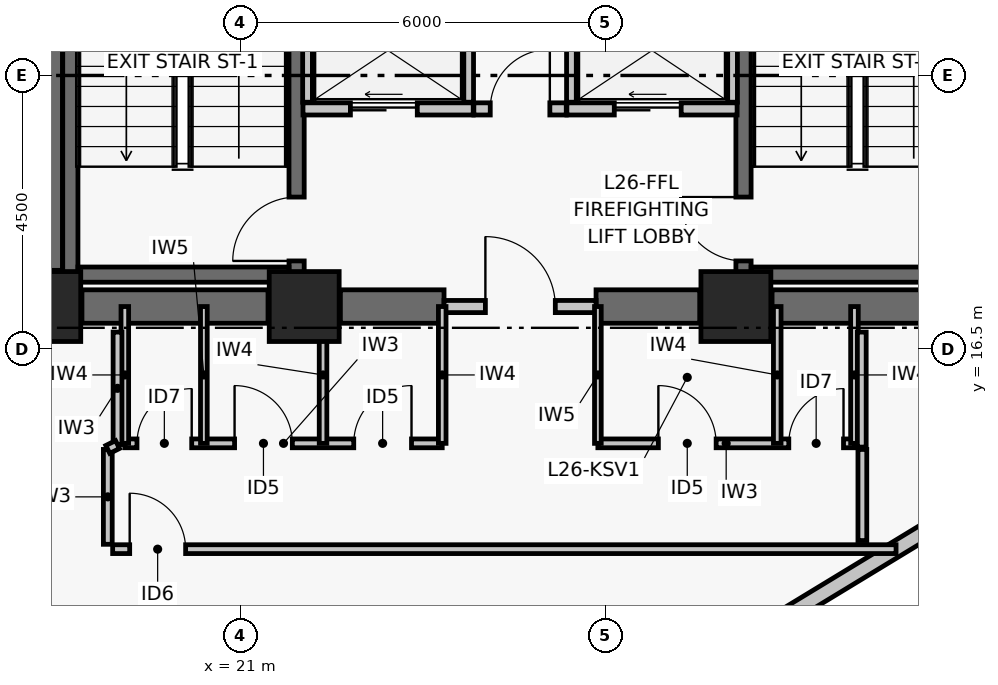
"""IFC4 building model, lengths in metres.
Left out: names, types, materials, properties, quantities, classifications, styles, units other than length and angle.
Written with IfcOpenShell. Run it as: python <this file> out.ifc"""

import sys

from ifc_helpers import new_model, si_unit, direction, frame, frame_2d, origin, origin_2d, place, context, subcontext, project, spatial, rectangle, extrude, element, fill, save


model = new_model("IFC4")
c1 = context("Model", 3, precision=1e-05, world=origin(), true_north=direction((0.0, 1.0)))
c2 = subcontext(c1, "Body", "Model", "MODEL_VIEW")
j1 = project(units=[si_unit("LENGTHUNIT", "METRE"), si_unit("PLANEANGLEUNIT", "RADIAN")], contexts=[c1])
p1 = place(None, origin())
s1 = spatial("IfcSite", under=j1, at=p1, CompositionType="ELEMENT")
p2 = place(p1, origin())
s2 = spatial("IfcBuilding", under=s1, at=p2, CompositionType="ELEMENT")
p3 = place(p2, frame((0.0, 0.0, 107.7)))
s3 = spatial("IfcBuildingStorey", under=s2, at=p3, CompositionType="ELEMENT", Elevation=107.7)
for number, where, z_axis, x_axis in (
    (1, (17.8, 17.2, 0.0), (0.0, 0.0, 1.0), (1.0, 0.0, 0.0)),
    (2, (22.05, 17.2, 0.0), (0.0, 0.0, 1.0), (1.0, 0.0, 0.0)),
    (3, (29.15, 17.2, 0.0), (0.0, 0.0, 1.0), (1.0, 0.0, 0.0)),
):
    element("IfcColumn", number, at=place(p3, frame(where, z_axis=z_axis, x_axis=x_axis)), inside=s3, PredefinedType="COLUMN", context=c2, shape_type="SweptSolid", body=[
        extrude(rectangle(XDim=1.15, YDim=1.15, at=origin_2d()), origin(), (0.0, 0.0, 1.0), 3.72),
    ])
p4 = place(p3, frame((18.395, 17.2, 0.0), z_axis=(0.0, 0.0, 1.0), x_axis=(1.0, 0.0, 0.0)))
e4 = element("IfcWall", 4, at=p4, inside=s3, PredefinedType="SHEAR", context=c2, shape_type="SweptSolid", body=[
    extrude(rectangle(XDim=3.06, YDim=0.55, at=frame_2d((1.53, 0.0))), origin(), (0.0, 0.0, 1.0), 3.47),
])
p5 = place(p3, frame((22.645, 17.2, 0.0), z_axis=(0.0, 0.0, 1.0), x_axis=(1.0, 0.0, 0.0)))
e5 = element("IfcWall", 5, at=p5, inside=s3, PredefinedType="SHEAR", context=c2, shape_type="SweptSolid", body=[
    extrude(rectangle(XDim=1.705, YDim=0.55, at=frame_2d((0.853, 0.0))), origin(), (0.0, 0.0, 1.0), 3.47),
])
p6 = place(p3, frame((26.85, 17.2, 0.0), z_axis=(0.0, 0.0, 1.0), x_axis=(1.0, 0.0, 0.0)))
e6 = element("IfcWall", 6, at=p6, inside=s3, PredefinedType="SHEAR", context=c2, shape_type="SweptSolid", body=[
    extrude(rectangle(XDim=1.705, YDim=0.55, at=frame_2d((0.853, 0.0))), origin(), (0.0, 0.0, 1.0), 3.47),
])
p7 = place(p3, frame((29.745, 17.2, 0.0), z_axis=(0.0, 0.0, 1.0), x_axis=(1.0, 0.0, 0.0)))
e7 = element("IfcWall", 7, at=p7, inside=s3, PredefinedType="SHEAR", context=c2, shape_type="SweptSolid", body=[
    extrude(rectangle(XDim=3.06, YDim=0.55, at=frame_2d((1.53, 0.0))), origin(), (0.0, 0.0, 1.0), 3.47),
])
p8 = place(p3, frame((17.8, 17.795, 0.0), z_axis=(0.0, 0.0, 1.0), x_axis=(0.0, 1.0, 0.0)))
e8 = element("IfcWall", 8, at=p8, inside=s3, PredefinedType="SHEAR", context=c2, shape_type="SweptSolid", body=[
    extrude(rectangle(XDim=8.41, YDim=0.55, at=frame_2d((4.205, 0.0))), origin(), (0.0, 0.0, 1.0), 3.47),
])
p9 = place(p3, frame((18.204, 17.6, 0.0), z_axis=(0.0, 0.0, 1.0), x_axis=(0.0, 1.0, 0.0)))
e9 = element("IfcWall", 9, at=p9, inside=s3, PredefinedType="SHEAR", context=c2, shape_type="SweptSolid", body=[
    extrude(rectangle(XDim=8.8, YDim=0.25, at=frame_2d((4.4, 0.0))), origin(), (0.0, 0.0, 1.0), 3.47),
])
p10 = place(p3, frame((21.925, 17.6, 0.0), z_axis=(0.0, 0.0, 1.0), x_axis=(0.0, 1.0, 0.0)))
e10 = element("IfcWall", 10, at=p10, inside=s3, PredefinedType="SHEAR", context=c2, shape_type="SweptSolid", body=[
    extrude(rectangle(XDim=8.8, YDim=0.25, at=frame_2d((4.4, 0.0))), origin(), (0.0, 0.0, 1.0), 3.47),
])
p11 = place(p10, frame((0.35, 0.0, 0.0)))
e11 = element("IfcOpeningElement", 11, at=p11, cuts=e10, PredefinedType="OPENING", context=c2, shape_type="SweptSolid", body=[
    extrude(rectangle(XDim=1.05, YDim=2.08, at=frame_2d((0.525, 1.04))), frame((0.0, 0.135, 0.0), z_axis=(0.0, -1.0, 0.0), x_axis=(1.0, 0.0, 0.0)), (0.0, 0.0, 1.0), 0.27),
])
p12 = place(p3, frame((18.329, 17.725, 0.0), z_axis=(0.0, 0.0, 1.0), x_axis=(1.0, 0.0, 0.0)))
e12 = element("IfcWall", 12, at=p12, inside=s3, PredefinedType="SHEAR", context=c2, shape_type="SweptSolid", body=[
    extrude(rectangle(XDim=3.471, YDim=0.25, at=frame_2d((1.735, 0.0))), origin(), (0.0, 0.0, 1.0), 3.47),
])
p13 = place(p3, frame((29.275, 17.6, 0.0), z_axis=(0.0, 0.0, 1.0), x_axis=(0.0, 1.0, 0.0)))
e13 = element("IfcWall", 13, at=p13, inside=s3, PredefinedType="SHEAR", context=c2, shape_type="SweptSolid", body=[
    extrude(rectangle(XDim=8.8, YDim=0.25, at=frame_2d((4.4, 0.0))), origin(), (0.0, 0.0, 1.0), 3.47),
])
p14 = place(p13, frame((0.35, 0.0, 0.0)))
e14 = element("IfcOpeningElement", 14, at=p14, cuts=e13, PredefinedType="OPENING", context=c2, shape_type="SweptSolid", body=[
    extrude(rectangle(XDim=1.05, YDim=2.08, at=frame_2d((0.525, 1.04))), frame((0.0, 0.135, 0.0), z_axis=(0.0, -1.0, 0.0), x_axis=(1.0, 0.0, 0.0)), (0.0, 0.0, 1.0), 0.27),
])
p15 = place(p3, frame((29.4, 17.725, 0.0), z_axis=(0.0, 0.0, 1.0), x_axis=(1.0, 0.0, 0.0)))
e15 = element("IfcWall", 15, at=p15, inside=s3, PredefinedType="SHEAR", context=c2, shape_type="SweptSolid", body=[
    extrude(rectangle(XDim=3.471, YDim=0.25, at=frame_2d((1.736, 0.0))), origin(), (0.0, 0.0, 1.0), 3.47),
])
p16 = place(p3, frame((35.48, 15.455, 0.0), z_axis=(0.0, 0.0, 1.0), x_axis=(-0.854673977685, -0.51916509115, 0.0)))
e16 = element("IfcWall", 16, at=p16, inside=s3, PredefinedType="PARTITIONING", context=c2, shape_type="SweptSolid", body=[
    extrude(rectangle(XDim=6.678, YDim=0.26, at=frame_2d((3.339, 0.0))), origin(), (0.0, 0.0, 1.0), 3.47),
])
p17 = place(p3, frame((24.35, 17.2, 0.0), z_axis=(0.0, 0.0, 1.0), x_axis=(1.0, 0.0, 0.0)))
e17 = element("IfcWall", 17, at=p17, inside=s3, PredefinedType="PARTITIONING", context=c2, shape_type="SweptSolid", body=[
    extrude(rectangle(XDim=2.5, YDim=0.2, at=frame_2d((1.25, 0.0))), origin(), (0.0, 0.0, 1.0), 2.6),
])
p18 = place(p17, frame((0.68, 0.0, 0.0)))
e18 = element("IfcOpeningElement", 18, at=p18, cuts=e17, PredefinedType="OPENING", context=c2, shape_type="SweptSolid", body=[
    extrude(rectangle(XDim=1.15, YDim=2.08, at=frame_2d((0.575, 1.04))), frame((0.0, 0.11, 0.0), z_axis=(0.0, -1.0, 0.0), x_axis=(1.0, 0.0, 0.0)), (0.0, 0.0, 1.0), 0.22),
])
p19 = place(p3, frame((24.84, 20.45, 0.0), z_axis=(0.0, 0.0, 1.0), x_axis=(1.0, 0.0, 0.0)))
e19 = element("IfcWall", 19, at=p19, inside=s3, PredefinedType="PARTITIONING", context=c2, shape_type="SweptSolid", body=[
    extrude(rectangle(XDim=1.52, YDim=0.2, at=frame_2d((0.76, 0.0))), origin(), (0.0, 0.0, 1.0), 3.47),
])
p20 = place(p19, frame((0.27, 0.0, 0.0)))
e20 = element("IfcOpeningElement", 20, at=p20, cuts=e19, PredefinedType="OPENING", context=c2, shape_type="SweptSolid", body=[
    extrude(rectangle(XDim=0.98, YDim=2.06, at=frame_2d((0.49, 1.03))), frame((0.0, 0.11, 0.0), z_axis=(0.0, -1.0, 0.0), x_axis=(1.0, 0.0, 0.0)), (0.0, 0.0, 1.0), 0.22),
])
p21 = place(p3, frame((22.03, 20.45, 0.0), z_axis=(0.0, 0.0, 1.0), x_axis=(1.0, 0.0, 0.0)))
e21 = element("IfcWall", 21, at=p21, inside=s3, PredefinedType="PARTITIONING", context=c2, shape_type="SweptSolid", body=[
    extrude(rectangle(XDim=2.8, YDim=0.2, at=frame_2d((1.4, 0.0))), origin(), (0.0, 0.0, 1.0), 3.47),
])
p22 = place(p21, frame((0.78, 0.0, 0.0)))
e22 = element("IfcOpeningElement", 22, at=p22, cuts=e21, PredefinedType="OPENING", context=c2, shape_type="SweptSolid", body=[
    extrude(rectangle(XDim=1.1, YDim=2.08, at=frame_2d((0.55, 1.04))), frame((0.0, 0.11, 0.0), z_axis=(0.0, -1.0, 0.0), x_axis=(1.0, 0.0, 0.0)), (0.0, 0.0, 1.0), 0.22),
])
p23 = place(p3, frame((26.37, 20.45, 0.0), z_axis=(0.0, 0.0, 1.0), x_axis=(1.0, 0.0, 0.0)))
e23 = element("IfcWall", 23, at=p23, inside=s3, PredefinedType="PARTITIONING", context=c2, shape_type="SweptSolid", body=[
    extrude(rectangle(XDim=2.8, YDim=0.2, at=frame_2d((1.4, 0.0))), origin(), (0.0, 0.0, 1.0), 3.47),
])
p24 = place(p23, frame((0.78, 0.0, 0.0)))
e24 = element("IfcOpeningElement", 24, at=p24, cuts=e23, PredefinedType="OPENING", context=c2, shape_type="SweptSolid", body=[
    extrude(rectangle(XDim=1.1, YDim=2.08, at=frame_2d((0.55, 1.04))), frame((0.0, 0.11, 0.0), z_axis=(0.0, -1.0, 0.0), x_axis=(1.0, 0.0, 0.0)), (0.0, 0.0, 1.0), 0.22),
])
for number, where, z_axis, x_axis in (
    (25, (22.105, 20.56, 0.0), (0.0, 0.0, 1.0), (0.0, 1.0, 0.0)),
    (26, (24.755, 20.56, 0.0), (0.0, 0.0, 1.0), (0.0, 1.0, 0.0)),
):
    element("IfcWall", number, at=place(p3, frame(where, z_axis=z_axis, x_axis=x_axis)), inside=s3, PredefinedType="PARTITIONING", context=c2, shape_type="SweptSolid", body=[
        extrude(rectangle(XDim=1.71, YDim=0.16, at=frame_2d((0.855, 0.0))), origin(), (0.0, 0.0, 1.0), 3.47),
    ])
p25 = place(p3, frame((29.095, 20.56, 0.0), z_axis=(0.0, 0.0, 1.0), x_axis=(0.0, 1.0, 0.0)))
e27 = element("IfcWall", 27, at=p25, inside=s3, PredefinedType="PARTITIONING", context=c2, shape_type="SweptSolid", body=[
    extrude(rectangle(XDim=5.45, YDim=0.16, at=frame_2d((2.725, 0.0))), origin(), (0.0, 0.0, 1.0), 3.47),
])
p26 = place(p3, frame((26.445, 20.56, 0.0), z_axis=(0.0, 0.0, 1.0), x_axis=(0.0, 1.0, 0.0)))
e28 = element("IfcWall", 28, at=p26, inside=s3, PredefinedType="PARTITIONING", context=c2, shape_type="SweptSolid", body=[
    extrude(rectangle(XDim=1.71, YDim=0.16, at=frame_2d((0.855, 0.0))), origin(), (0.0, 0.0, 1.0), 3.47),
])
p27 = place(p3, frame((19.1, 14.95, 0.0), z_axis=(0.0, 0.0, 1.0), x_axis=(1.0, 0.0, 0.0)))
e29 = element("IfcWall", 29, at=p27, inside=s3, PredefinedType="PARTITIONING", context=c2, shape_type="SweptSolid", body=[
    extrude(rectangle(XDim=5.22, YDim=0.145, at=frame_2d((2.61, 0.0))), origin(), (0.0, 0.0, 1.0), 2.65),
])
p28 = place(p27, frame((0.2, 0.0, 0.0)))
e30 = element("IfcOpeningElement", 30, at=p28, cuts=e29, PredefinedType="OPENING", context=c2, shape_type="SweptSolid", body=[
    extrude(rectangle(XDim=0.9, YDim=2.02, at=frame_2d((0.45, 1.01))), frame((0.0, 0.083, 0.0), z_axis=(0.0, -1.0, 0.0), x_axis=(1.0, 0.0, 0.0)), (0.0, 0.0, 1.0), 0.165),
])
p29 = place(p27, frame((1.805, 0.0, 0.0)))
e31 = element("IfcOpeningElement", 31, at=p29, cuts=e29, PredefinedType="OPENING", context=c2, shape_type="SweptSolid", body=[
    extrude(rectangle(XDim=0.95, YDim=2.06, at=frame_2d((0.475, 1.03))), frame((0.0, 0.083, 0.0), z_axis=(0.0, -1.0, 0.0), x_axis=(1.0, 0.0, 0.0)), (0.0, 0.0, 1.0), 0.165),
])
p30 = place(p27, frame((3.765, 0.0, 0.0)))
e32 = element("IfcOpeningElement", 32, at=p30, cuts=e29, PredefinedType="OPENING", context=c2, shape_type="SweptSolid", body=[
    extrude(rectangle(XDim=0.95, YDim=2.06, at=frame_2d((0.475, 1.03))), frame((0.0, 0.083, 0.0), z_axis=(0.0, -1.0, 0.0), x_axis=(1.0, 0.0, 0.0)), (0.0, 0.0, 1.0), 0.165),
])
p31 = place(p3, frame((26.88, 14.95, 0.0), z_axis=(0.0, 0.0, 1.0), x_axis=(1.0, 0.0, 0.0)))
e33 = element("IfcWall", 33, at=p31, inside=s3, PredefinedType="PARTITIONING", context=c2, shape_type="SweptSolid", body=[
    extrude(rectangle(XDim=4.22, YDim=0.145, at=frame_2d((2.11, 0.0))), origin(), (0.0, 0.0, 1.0), 3.05),
])
p32 = place(p31, frame((0.995, 0.0, 0.0)))
e34 = element("IfcOpeningElement", 34, at=p32, cuts=e33, PredefinedType="OPENING", context=c2, shape_type="SweptSolid", body=[
    extrude(rectangle(XDim=0.95, YDim=2.06, at=frame_2d((0.475, 1.03))), frame((0.0, 0.083, 0.0), z_axis=(0.0, -1.0, 0.0), x_axis=(1.0, 0.0, 0.0)), (0.0, 0.0, 1.0), 0.165),
])
p33 = place(p31, frame((3.14, 0.0, 0.0)))
e35 = element("IfcOpeningElement", 35, at=p33, cuts=e33, PredefinedType="OPENING", context=c2, shape_type="SweptSolid", body=[
    extrude(rectangle(XDim=0.9, YDim=2.02, at=frame_2d((0.45, 1.01))), frame((0.0, 0.083, 0.0), z_axis=(0.0, -1.0, 0.0), x_axis=(1.0, 0.0, 0.0)), (0.0, 0.0, 1.0), 0.165),
])
p34 = place(p3, frame((19.1, 14.95, 0.0), z_axis=(0.0, 0.0, 1.0), x_axis=(0.0, 1.0, 0.0)))
e36 = element("IfcWall", 36, at=p34, inside=s3, PredefinedType="PARTITIONING", context=c2, shape_type="SweptSolid", body=[
    extrude(rectangle(XDim=2.25, YDim=0.125, at=frame_2d((1.125, 0.0))), origin(), (0.0, 0.0, 1.0), 2.6),
])
p35 = place(p3, frame((20.4, 14.95, 0.0), z_axis=(0.0, 0.0, 1.0), x_axis=(0.0, 1.0, 0.0)))
e37 = element("IfcWall", 37, at=p35, inside=s3, PredefinedType="PARTITIONING", context=c2, shape_type="SweptSolid", body=[
    extrude(rectangle(XDim=2.25, YDim=0.11, at=frame_2d((1.125, 0.0))), origin(), (0.0, 0.0, 1.0), 2.6),
])
for number, where, z_axis, x_axis in (
    (38, (22.36, 14.95, 0.0), (0.0, 0.0, 1.0), (0.0, 1.0, 0.0)),
    (39, (24.32, 14.95, 0.0), (0.0, 0.0, 1.0), (0.0, 1.0, 0.0)),
):
    element("IfcWall", number, at=place(p3, frame(where, z_axis=z_axis, x_axis=x_axis)), inside=s3, PredefinedType="PARTITIONING", context=c2, shape_type="SweptSolid", body=[
        extrude(rectangle(XDim=2.25, YDim=0.125, at=frame_2d((1.125, 0.0))), origin(), (0.0, 0.0, 1.0), 2.6),
    ])
p36 = place(p3, frame((26.88, 14.95, 0.0), z_axis=(0.0, 0.0, 1.0), x_axis=(0.0, 1.0, 0.0)))
e40 = element("IfcWall", 40, at=p36, inside=s3, PredefinedType="PARTITIONING", context=c2, shape_type="SweptSolid", body=[
    extrude(rectangle(XDim=2.25, YDim=0.11, at=frame_2d((1.125, 0.0))), origin(), (0.0, 0.0, 1.0), 2.6),
])
for number, where, z_axis, x_axis in (
    (41, (29.83, 14.95, 0.0), (0.0, 0.0, 1.0), (0.0, 1.0, 0.0)),
    (42, (31.1, 14.95, 0.0), (0.0, 0.0, 1.0), (0.0, 1.0, 0.0)),
):
    element("IfcWall", number, at=place(p3, frame(where, z_axis=z_axis, x_axis=x_axis)), inside=s3, PredefinedType="PARTITIONING", context=c2, shape_type="SweptSolid", body=[
        extrude(rectangle(XDim=2.25, YDim=0.125, at=frame_2d((1.125, 0.0))), origin(), (0.0, 0.0, 1.0), 2.6),
    ])
p37 = place(p3, frame((18.98, 16.78, 0.0), z_axis=(0.0, 0.0, 1.0), x_axis=(0.0, -1.0, 0.0)))
e43 = element("IfcWall", 43, at=p37, inside=s3, PredefinedType="PARTITIONING", context=c2, shape_type="SweptSolid", body=[
    extrude(rectangle(XDim=1.85, YDim=0.145, at=frame_2d((0.925, 0.0))), origin(), (0.0, 0.0, 1.0), 2.6),
])
p38 = place(p3, frame((18.82, 14.85, 0.0), z_axis=(0.0, 0.0, 1.0), x_axis=(0.0, -1.0, 0.0)))
e44 = element("IfcWall", 44, at=p38, inside=s3, PredefinedType="PARTITIONING", context=c2, shape_type="SweptSolid", body=[
    extrude(rectangle(XDim=1.56, YDim=0.145, at=frame_2d((0.78, 0.0))), origin(), (0.0, 0.0, 1.0), 3.05),
])
p39 = place(p3, frame((18.9, 13.21, 0.0), z_axis=(0.0, 0.0, 1.0), x_axis=(1.0, 0.0, 0.0)))
e45 = element("IfcWall", 45, at=p39, inside=s3, PredefinedType="PARTITIONING", context=c2, shape_type="SweptSolid", body=[
    extrude(rectangle(XDim=12.884, YDim=0.145, at=frame_2d((6.442, 0.0))), origin(), (0.0, 0.0, 1.0), 2.65),
])
p40 = place(p39, frame((0.28, 0.0, 0.0)))
e46 = element("IfcOpeningElement", 46, at=p40, cuts=e45, PredefinedType="OPENING", context=c2, shape_type="SweptSolid", body=[
    extrude(rectangle(XDim=0.92, YDim=2.05, at=frame_2d((0.46, 1.025))), frame((0.0, 0.083, 0.0), z_axis=(0.0, -1.0, 0.0), x_axis=(1.0, 0.0, 0.0)), (0.0, 0.0, 1.0), 0.165),
])
p41 = place(p3, frame((31.23, 13.351, 0.0), z_axis=(0.0, 0.0, 1.0), x_axis=(0.0, 1.0, 0.0)))
e47 = element("IfcWall", 47, at=p41, inside=s3, PredefinedType="PARTITIONING", context=c2, shape_type="SweptSolid", body=[
    extrude(rectangle(XDim=1.499, YDim=0.145, at=frame_2d((0.75, 0.0))), origin(), (0.0, 0.0, 1.0), 2.9),
])
p42 = place(p3, frame((31.22, 14.889, 0.0), z_axis=(0.0, 0.0, 1.0), x_axis=(0.0, 1.0, 0.0)))
e48 = element("IfcWall", 48, at=p42, inside=s3, PredefinedType="PARTITIONING", context=c2, shape_type="SweptSolid", body=[
    extrude(rectangle(XDim=1.891, YDim=0.145, at=frame_2d((0.946, 0.0))), origin(), (0.0, 0.0, 1.0), 2.6),
])
p43 = place(p3, frame((18.82, 14.85, 0.0), z_axis=(0.0, 0.0, 1.0), x_axis=(0.89470021502, 0.446667130247, 0.0)))
e49 = element("IfcWall", 49, at=p43, inside=s3, PredefinedType="PARTITIONING", context=c2, shape_type="SweptSolid", body=[
    extrude(rectangle(XDim=0.179, YDim=0.145, at=frame_2d((0.089, 0.0))), origin(), (0.0, 0.0, 1.0), 3.47),
])
p44 = place(p11, origin())
e50 = element("IfcDoor", 50, at=p44, inside=s3, OperationType="SINGLE_SWING_LEFT", PredefinedType="DOOR", context=c2, shape_type="SweptSolid", body=[
    extrude(rectangle(XDim=1.05, YDim=2.08, at=frame_2d((0.525, 1.04))), frame((0.0, 0.025, 0.0), z_axis=(0.0, -1.0, 0.0), x_axis=(1.0, 0.0, 0.0)), (0.0, 0.0, 1.0), 0.05),
])
fill(e11, e50)
p45 = place(p14, origin())
e51 = element("IfcDoor", 51, at=p45, inside=s3, OperationType="SINGLE_SWING_RIGHT", PredefinedType="DOOR", context=c2, shape_type="SweptSolid", body=[
    extrude(rectangle(XDim=1.05, YDim=2.08, at=frame_2d((0.525, 1.04))), frame((0.0, 0.025, 0.0), z_axis=(0.0, -1.0, 0.0), x_axis=(1.0, 0.0, 0.0)), (0.0, 0.0, 1.0), 0.05),
])
fill(e14, e51)
p46 = place(p18, origin())
e52 = element("IfcDoor", 52, at=p46, inside=s3, OperationType="SINGLE_SWING_LEFT", PredefinedType="DOOR", context=c2, shape_type="SweptSolid", body=[
    extrude(rectangle(XDim=1.15, YDim=2.08, at=frame_2d((0.575, 1.04))), frame((0.0, 0.025, 0.0), z_axis=(0.0, -1.0, 0.0), x_axis=(1.0, 0.0, 0.0)), (0.0, 0.0, 1.0), 0.05),
])
fill(e18, e52)
p47 = place(p20, origin())
e53 = element("IfcDoor", 53, at=p47, inside=s3, OperationType="SINGLE_SWING_RIGHT", PredefinedType="DOOR", context=c2, shape_type="SweptSolid", body=[
    extrude(rectangle(XDim=0.98, YDim=2.06, at=frame_2d((0.49, 1.03))), frame((0.0, 0.025, 0.0), z_axis=(0.0, -1.0, 0.0), x_axis=(1.0, 0.0, 0.0)), (0.0, 0.0, 1.0), 0.05),
])
fill(e20, e53)
p48 = place(p22, origin())
e54 = element("IfcDoor", 54, at=p48, inside=s3, OperationType="DOUBLE_DOOR_SLIDING", PredefinedType="DOOR", context=c2, shape_type="SweptSolid", body=[
    extrude(rectangle(XDim=1.1, YDim=2.08, at=frame_2d((0.55, 1.04))), frame((0.0, 0.025, 0.0), z_axis=(0.0, -1.0, 0.0), x_axis=(1.0, 0.0, 0.0)), (0.0, 0.0, 1.0), 0.05),
])
fill(e22, e54)
p49 = place(p24, origin())
e55 = element("IfcDoor", 55, at=p49, inside=s3, OperationType="DOUBLE_DOOR_SLIDING", PredefinedType="DOOR", context=c2, shape_type="SweptSolid", body=[
    extrude(rectangle(XDim=1.1, YDim=2.08, at=frame_2d((0.55, 1.04))), frame((0.0, 0.025, 0.0), z_axis=(0.0, -1.0, 0.0), x_axis=(1.0, 0.0, 0.0)), (0.0, 0.0, 1.0), 0.05),
])
fill(e24, e55)
p50 = place(p28, origin())
e56 = element("IfcDoor", 56, at=p50, inside=s3, OperationType="SINGLE_SWING_RIGHT", PredefinedType="DOOR", context=c2, shape_type="SweptSolid", body=[
    extrude(rectangle(XDim=0.9, YDim=2.02, at=frame_2d((0.45, 1.01))), frame((0.0, 0.025, 0.0), z_axis=(0.0, -1.0, 0.0), x_axis=(1.0, 0.0, 0.0)), (0.0, 0.0, 1.0), 0.05),
])
fill(e30, e56)
p51 = place(p29, origin())
e57 = element("IfcDoor", 57, at=p51, inside=s3, OperationType="SINGLE_SWING_LEFT", PredefinedType="DOOR", context=c2, shape_type="SweptSolid", body=[
    extrude(rectangle(XDim=0.95, YDim=2.06, at=frame_2d((0.475, 1.03))), frame((0.0, 0.025, 0.0), z_axis=(0.0, -1.0, 0.0), x_axis=(1.0, 0.0, 0.0)), (0.0, 0.0, 1.0), 0.05),
])
fill(e31, e57)
p52 = place(p30, origin())
e58 = element("IfcDoor", 58, at=p52, inside=s3, OperationType="SINGLE_SWING_RIGHT", PredefinedType="DOOR", context=c2, shape_type="SweptSolid", body=[
    extrude(rectangle(XDim=0.95, YDim=2.06, at=frame_2d((0.475, 1.03))), frame((0.0, 0.025, 0.0), z_axis=(0.0, -1.0, 0.0), x_axis=(1.0, 0.0, 0.0)), (0.0, 0.0, 1.0), 0.05),
])
fill(e32, e58)
p53 = place(p32, origin())
e59 = element("IfcDoor", 59, at=p53, inside=s3, OperationType="SINGLE_SWING_LEFT", PredefinedType="DOOR", context=c2, shape_type="SweptSolid", body=[
    extrude(rectangle(XDim=0.95, YDim=2.06, at=frame_2d((0.475, 1.03))), frame((0.0, 0.025, 0.0), z_axis=(0.0, -1.0, 0.0), x_axis=(1.0, 0.0, 0.0)), (0.0, 0.0, 1.0), 0.05),
])
fill(e34, e59)
p54 = place(p33, origin())
e60 = element("IfcDoor", 60, at=p54, inside=s3, OperationType="SINGLE_SWING_RIGHT", PredefinedType="DOOR", context=c2, shape_type="SweptSolid", body=[
    extrude(rectangle(XDim=0.9, YDim=2.02, at=frame_2d((0.45, 1.01))), frame((0.0, 0.025, 0.0), z_axis=(0.0, -1.0, 0.0), x_axis=(1.0, 0.0, 0.0)), (0.0, 0.0, 1.0), 0.05),
])
fill(e35, e60)
p55 = place(p40, origin())
e61 = element("IfcDoor", 61, at=p55, inside=s3, OperationType="SINGLE_SWING_LEFT", PredefinedType="DOOR", context=c2, shape_type="SweptSolid", body=[
    extrude(rectangle(XDim=0.92, YDim=2.05, at=frame_2d((0.46, 1.025))), frame((0.0, 0.025, 0.0), z_axis=(0.0, -1.0, 0.0), x_axis=(1.0, 0.0, 0.0)), (0.0, 0.0, 1.0), 0.05),
])
fill(e46, e61)
save(model, sys.argv[1])
